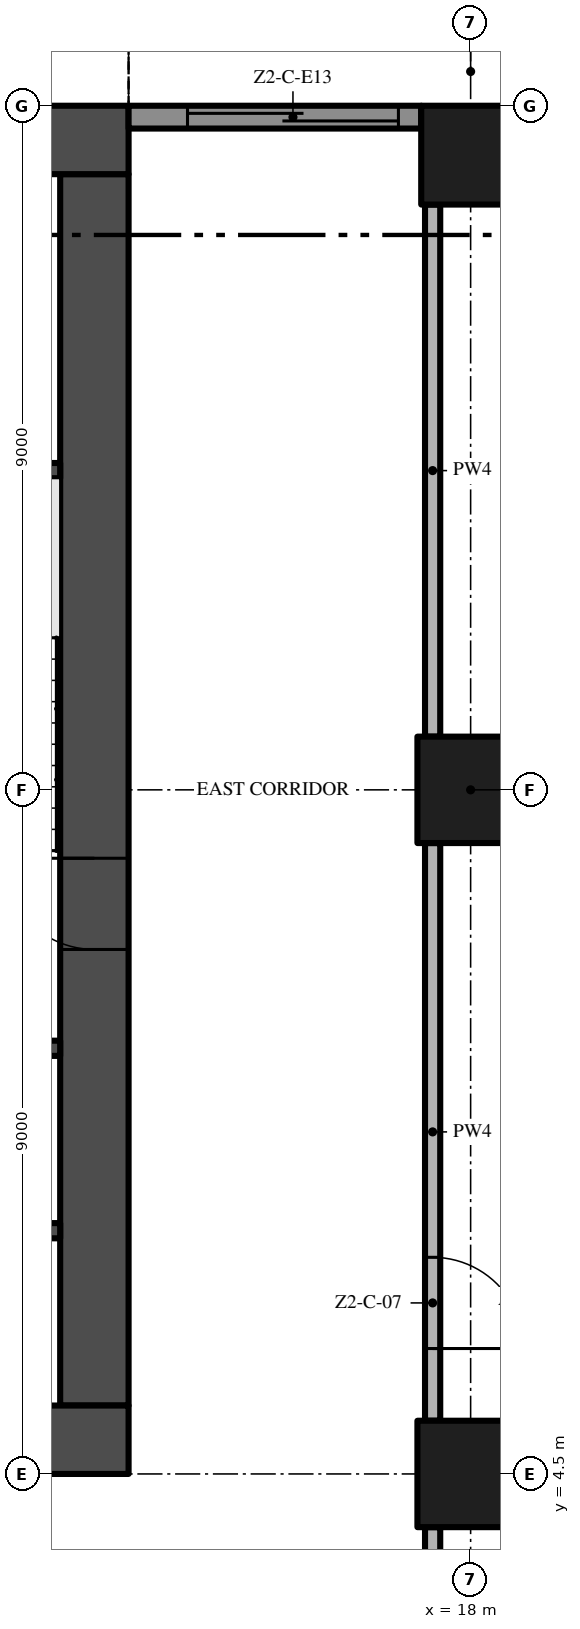
"""IFC4 building model, lengths in metres.
Left out: names, types, materials, properties, quantities, classifications, styles, units other than length and angle.
Written with IfcOpenShell. Run it as: python <this file> out.ifc"""

import sys

from ifc_helpers import new_model, si_unit, direction, frame, frame_2d, origin, origin_2d, place, context, subcontext, project, spatial, polyline, rectangle, outline, extrude, element, fill, save


model = new_model("IFC4")
c1 = context("Model", 3, precision=1e-05, world=origin(), true_north=direction((0.0, 1.0)))
c2 = subcontext(c1, "Body", "Model", "MODEL_VIEW")
j1 = project(units=[si_unit("LENGTHUNIT", "METRE"), si_unit("PLANEANGLEUNIT", "RADIAN")], contexts=[c1])
p1 = place(None, origin())
s1 = spatial("IfcSite", under=j1, at=p1, CompositionType="ELEMENT")
p2 = place(p1, origin())
s2 = spatial("IfcBuilding", under=s1, at=p2, CompositionType="ELEMENT")
p3 = place(p2, frame((0.0, 0.0, 96.0)))
s3 = spatial("IfcBuildingStorey", under=s2, at=p3, CompositionType="ELEMENT", Elevation=96.0)
p4 = place(p3, frame((-13.5, 4.95, -0.3), z_axis=(0.0, 0.0, 1.0), x_axis=(1.0, 0.0, 0.0)))
e1 = element("IfcWall", 1, at=p4, inside=s3, PredefinedType="SHEAR", context=c2, shape_type="SweptSolid", body=[
    extrude(rectangle(XDim=27.0, YDim=0.9, at=frame_2d((13.5, 0.0))), origin(), (0.0, 0.0, 1.0), 3.8),
])
p5 = place(p4, frame((12.0, 0.0, 0.3)))
e2 = element("IfcOpeningElement", 2, at=p5, cuts=e1, PredefinedType="OPENING", context=c2, shape_type="SweptSolid", body=[
    extrude(rectangle(XDim=3.0, YDim=2.4, at=frame_2d((1.5, 1.2))), frame((0.0, 0.46, 0.0), z_axis=(0.0, -1.0, 0.0), x_axis=(1.0, 0.0, 0.0)), (0.0, 0.0, 1.0), 0.92),
])
p6 = place(p4, frame((4.9, 0.0, 0.3)))
e3 = element("IfcOpeningElement", 3, at=p6, cuts=e1, PredefinedType="OPENING", context=c2, shape_type="SweptSolid", body=[
    extrude(rectangle(XDim=1.2, YDim=2.2, at=frame_2d((0.6, 1.1))), frame((0.0, 0.46, 0.0), z_axis=(0.0, -1.0, 0.0), x_axis=(1.0, 0.0, 0.0)), (0.0, 0.0, 1.0), 0.92),
])
p7 = place(p4, frame((20.75, 0.0, 0.3)))
e4 = element("IfcOpeningElement", 4, at=p7, cuts=e1, PredefinedType="OPENING", context=c2, shape_type="SweptSolid", body=[
    extrude(rectangle(XDim=1.5, YDim=2.2, at=frame_2d((0.75, 1.1))), frame((0.0, 0.46, 0.0), z_axis=(0.0, -1.0, 0.0), x_axis=(1.0, 0.0, 0.0)), (0.0, 0.0, 1.0), 0.92),
])
p8 = place(p4, frame((17.4, 0.0, 0.3)))
e5 = element("IfcOpeningElement", 5, at=p8, cuts=e1, PredefinedType="OPENING", context=c2, shape_type="SweptSolid", body=[
    extrude(rectangle(XDim=1.2, YDim=2.2, at=frame_2d((0.6, 1.1))), frame((0.0, 0.46, 0.0), z_axis=(0.0, -1.0, 0.0), x_axis=(1.0, 0.0, 0.0)), (0.0, 0.0, 1.0), 0.92),
])
p9 = place(p3, frame((13.05, 5.4, -0.3), z_axis=(0.0, 0.0, 1.0), x_axis=(0.0, 1.0, 0.0)))
e6 = element("IfcWall", 6, at=p9, inside=s3, PredefinedType="SHEAR", context=c2, shape_type="SweptSolid", body=[
    extrude(rectangle(XDim=16.2, YDim=0.9, at=frame_2d((8.1, 0.0))), origin(), (0.0, 0.0, 1.0), 3.8),
])
p10 = place(p9, frame((6.0, 0.0, 0.3)))
e7 = element("IfcOpeningElement", 7, at=p10, cuts=e6, PredefinedType="OPENING", context=c2, shape_type="SweptSolid", body=[
    extrude(rectangle(XDim=1.2, YDim=2.2, at=frame_2d((0.6, 1.1))), frame((0.0, 0.46, 0.0), z_axis=(0.0, -1.0, 0.0), x_axis=(1.0, 0.0, 0.0)), (0.0, 0.0, 1.0), 0.92),
])
p11 = place(p3, frame((13.5, 22.05, -0.3), z_axis=(0.0, 0.0, 1.0), x_axis=(-1.0, 0.0, 0.0)))
e8 = element("IfcWall", 8, at=p11, inside=s3, PredefinedType="SHEAR", context=c2, shape_type="SweptSolid", body=[
    extrude(rectangle(XDim=27.0, YDim=0.9, at=frame_2d((13.5, 0.0))), origin(), (0.0, 0.0, 1.0), 3.8),
])
p12 = place(p3, frame((18.0, 13.5, 0.0), z_axis=(0.0, 0.0, 1.0), x_axis=(1.0, 0.0, 0.0)))
e9 = element("IfcColumn", 9, at=p12, inside=s3, PredefinedType="COLUMN", context=c2, shape_type="SweptSolid", body=[
    extrude(rectangle(XDim=1.4, YDim=1.4, at=origin_2d()), origin(), (0.0, 0.0, 1.0), 3.5),
])
p13 = place(p3, frame((18.0, 21.85, 0.0), z_axis=(0.0, 0.0, 1.0), x_axis=(1.0, 0.0, 0.0)))
e10 = element("IfcColumn", 10, at=p13, inside=s3, PredefinedType="COLUMN", context=c2, shape_type="SweptSolid", body=[
    extrude(rectangle(XDim=1.3, YDim=1.3, at=origin_2d()), origin(), (0.0, 0.0, 1.0), 3.5),
])
p14 = place(p3, frame((18.0, 4.5, 0.0), z_axis=(0.0, 0.0, 1.0), x_axis=(1.0, 0.0, 0.0)))
e11 = element("IfcColumn", 11, at=p14, inside=s3, PredefinedType="COLUMN", context=c2, shape_type="SweptSolid", body=[
    extrude(rectangle(XDim=1.4, YDim=1.4, at=origin_2d()), origin(), (0.0, 0.0, 1.0), 3.5),
])
p15 = place(p3, frame((13.5, 22.35, 0.0), z_axis=(0.0, 0.0, 1.0), x_axis=(1.0, 0.0, 0.0)))
e12 = element("IfcWall", 12, at=p15, inside=s3, PredefinedType="SOLIDWALL", context=c2, shape_type="SweptSolid", body=[
    extrude(rectangle(XDim=3.85, YDim=0.3, at=frame_2d((1.925, 0.0))), origin(), (0.0, 0.0, 1.0), 3.5),
])
p16 = place(p15, frame((0.775, 0.0, 0.0)))
e13 = element("IfcOpeningElement", 13, at=p16, cuts=e12, PredefinedType="OPENING", context=c2, shape_type="SweptSolid", body=[
    extrude(rectangle(XDim=2.775, YDim=2.4, at=frame_2d((1.387, 1.2))), frame((0.0, 0.16, 0.0), z_axis=(0.0, -1.0, 0.0), x_axis=(1.0, 0.0, 0.0)), (0.0, 0.0, 1.0), 0.32),
])
p17 = place(p3, origin())
e14 = element("IfcWall", 14, at=p17, inside=s3, PredefinedType="USERDEFINED", context=c2, shape_type="SweptSolid", body=[
    extrude(outline(polyline([(22.5, 23.451), (21.0, 23.115), (20.625, 23.1), (19.5, 23.231), (18.0, 23.755), (16.5, 24.488), (15.0, 25.149), (13.5, 25.485), (13.445, 25.241), (14.921, 24.91), (16.395, 24.261), (17.904, 23.524), (19.444, 22.986), (20.615, 22.849), (21.033, 22.866), (22.555, 23.208), (22.5, 23.451)])), origin(), (0.0, 0.0, 1.0), 0.9),
])
for number, where, z_axis, x_axis in (
    (15, (9.65, 7.7, 0.0), (0.0, 0.0, 1.0), (1.0, 0.0, 0.0)),
    (16, (9.65, 10.1, 0.0), (0.0, 0.0, 1.0), (1.0, 0.0, 0.0)),
    (17, (9.65, 17.7, 0.0), (0.0, 0.0, 1.0), (1.0, 0.0, 0.0)),
):
    element("IfcWall", number, at=place(p3, frame(where, z_axis=z_axis, x_axis=x_axis)), inside=s3, PredefinedType="SHEAR", context=c2, shape_type="SweptSolid", body=[
        extrude(rectangle(XDim=2.95, YDim=0.2, at=frame_2d((1.475, 0.0))), origin(), (0.0, 0.0, 1.0), 3.5),
    ])
p18 = place(p3, frame((17.5, -0.2, 0.0), z_axis=(0.0, 0.0, 1.0), x_axis=(0.0, 1.0, 0.0)))
e18 = element("IfcWall", 18, at=p18, inside=s3, PredefinedType="PARTITIONING", context=c2, shape_type="SweptSolid", body=[
    extrude(rectangle(XDim=4.0, YDim=0.2, at=frame_2d((2.0, 0.0))), origin(), (0.0, 0.0, 1.0), 3.5),
])
p19 = place(p3, frame((17.5, 12.8, 0.0), z_axis=(0.0, 0.0, 1.0), x_axis=(0.0, -1.0, 0.0)))
e19 = element("IfcWall", 19, at=p19, inside=s3, PredefinedType="PARTITIONING", context=c2, shape_type="SweptSolid", body=[
    extrude(rectangle(XDim=7.6, YDim=0.2, at=frame_2d((3.8, 0.0))), origin(), (0.0, 0.0, 1.0), 3.5),
])
p20 = place(p19, frame((5.45, 0.0, 0.0)))
e20 = element("IfcOpeningElement", 20, at=p20, cuts=e19, PredefinedType="OPENING", context=c2, shape_type="SweptSolid", body=[
    extrude(rectangle(XDim=1.2, YDim=2.4, at=frame_2d((0.6, 1.2))), frame((0.0, 0.11, 0.0), z_axis=(0.0, -1.0, 0.0), x_axis=(1.0, 0.0, 0.0)), (0.0, 0.0, 1.0), 0.22),
])
p21 = place(p3, frame((17.5, 14.2, 0.0), z_axis=(0.0, 0.0, 1.0), x_axis=(0.0, 1.0, 0.0)))
e21 = element("IfcWall", 21, at=p21, inside=s3, PredefinedType="PARTITIONING", context=c2, shape_type="SweptSolid", body=[
    extrude(rectangle(XDim=7.0, YDim=0.2, at=frame_2d((3.5, 0.0))), origin(), (0.0, 0.0, 1.0), 3.5),
])
p22 = place(p16, origin())
e22 = element("IfcDoor", 22, at=p22, inside=s3, OperationType="SINGLE_SWING_LEFT", PredefinedType="DOOR", context=c2, shape_type="SweptSolid", body=[
    extrude(rectangle(XDim=2.775, YDim=2.4, at=frame_2d((1.387, 1.2))), frame((0.0, 0.025, 0.0), z_axis=(0.0, -1.0, 0.0), x_axis=(1.0, 0.0, 0.0)), (0.0, 0.0, 1.0), 0.05),
])
fill(e13, e22)
p23 = place(p10, frame((1.2, 0.0, 0.0), z_axis=(0.0, 0.0, 1.0), x_axis=(-1.0, 0.0, 0.0)))
e23 = element("IfcDoor", 23, at=p23, inside=s3, OperationType="SINGLE_SWING_LEFT", PredefinedType="DOOR", context=c2, shape_type="SweptSolid", body=[
    extrude(rectangle(XDim=1.2, YDim=2.2, at=frame_2d((0.6, 1.1))), frame((0.0, 0.025, 0.0), z_axis=(0.0, -1.0, 0.0), x_axis=(1.0, 0.0, 0.0)), (0.0, 0.0, 1.0), 0.05),
])
fill(e7, e23)
p24 = place(p20, origin())
e24 = element("IfcDoor", 24, at=p24, inside=s3, OperationType="SINGLE_SWING_RIGHT", PredefinedType="DOOR", context=c2, shape_type="SweptSolid", body=[
    extrude(rectangle(XDim=1.2, YDim=2.4, at=frame_2d((0.6, 1.2))), frame((0.0, 0.025, 0.0), z_axis=(0.0, -1.0, 0.0), x_axis=(1.0, 0.0, 0.0)), (0.0, 0.0, 1.0), 0.05),
])
fill(e20, e24)
save(model, sys.argv[1])
